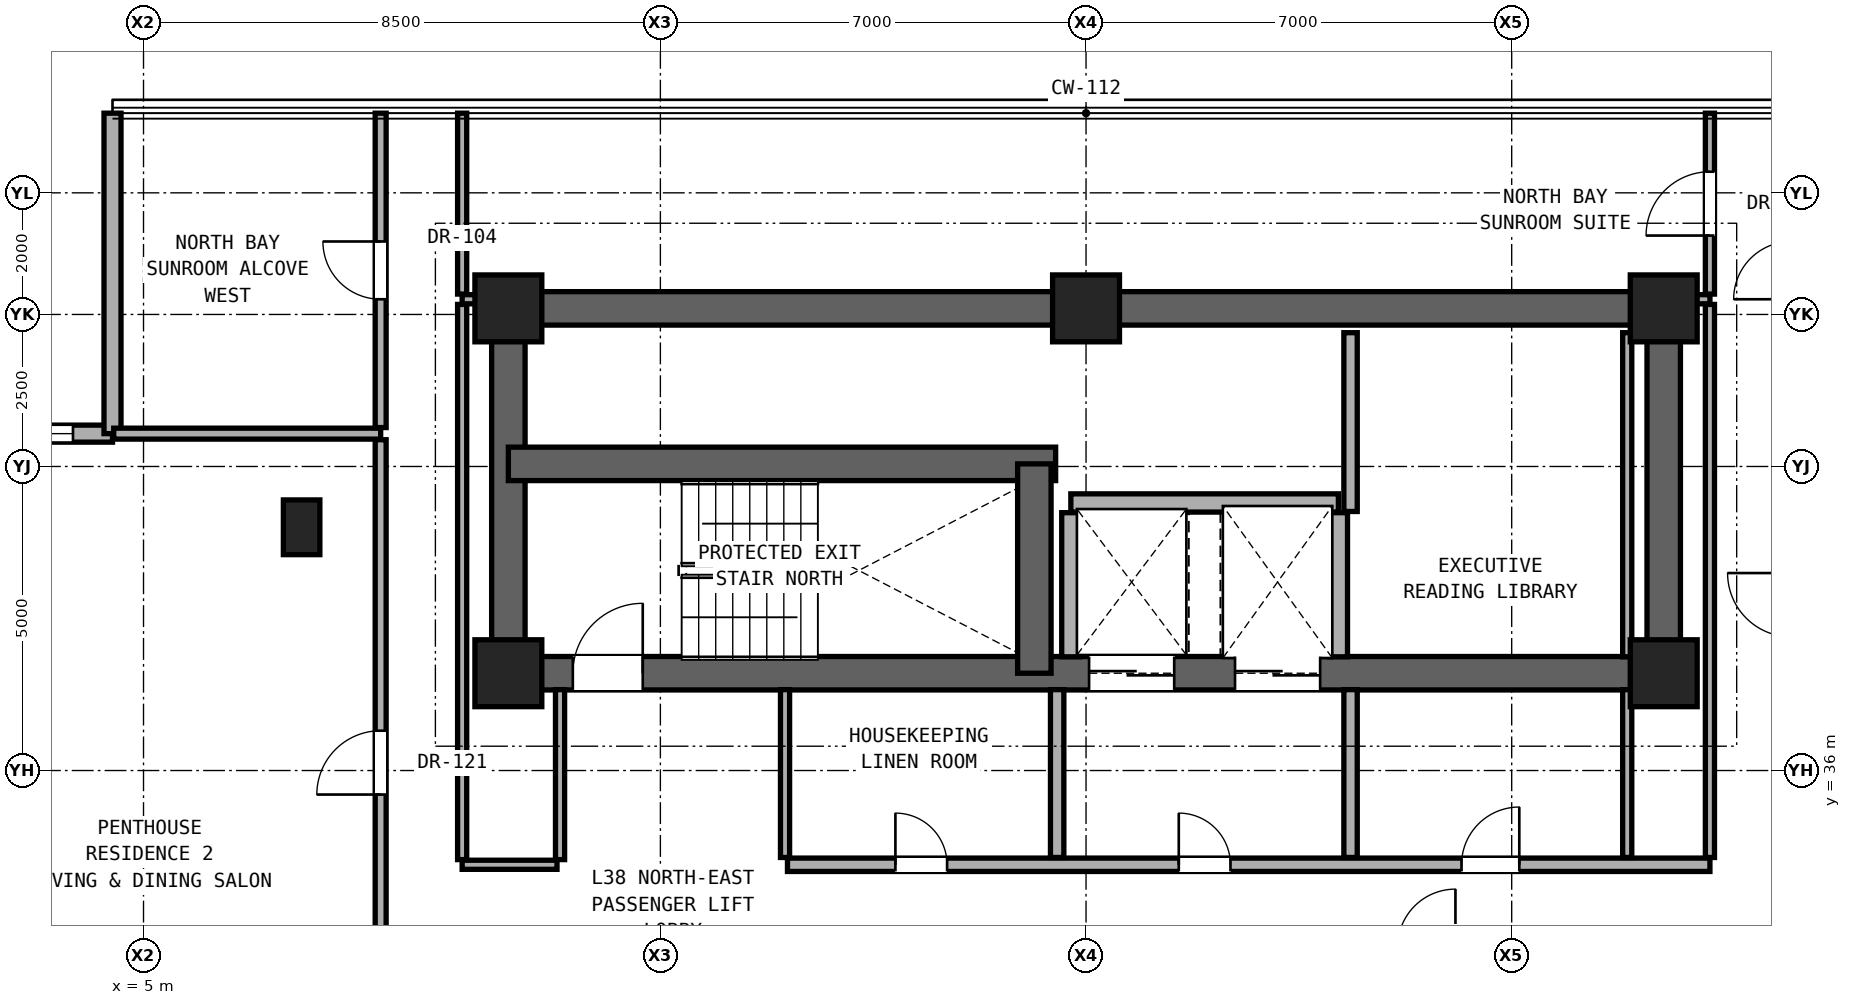
"""IFC4 building model, lengths in metres.
Left out: names, types, materials, properties, quantities, classifications, styles, units other than length and angle.
Written with IfcOpenShell. Run it as: python <this file> out.ifc"""

import sys

from ifc_helpers import new_model, si_unit, direction, frame, frame_2d, origin, origin_2d, place, context, subcontext, project, spatial, rectangle, extrude, element, fill, save


model = new_model("IFC4")
c1 = context("Model", 3, precision=1e-05, world=origin(), true_north=direction((0.0, 1.0)))
c2 = subcontext(c1, "Body", "Model", "MODEL_VIEW")
j1 = project(units=[si_unit("LENGTHUNIT", "METRE"), si_unit("PLANEANGLEUNIT", "RADIAN")], contexts=[c1])
p1 = place(None, origin())
s1 = spatial("IfcSite", under=j1, at=p1, CompositionType="ELEMENT")
p2 = place(p1, origin())
s2 = spatial("IfcBuilding", under=s1, at=p2, CompositionType="ELEMENT")
p3 = place(p2, frame((0.0, 0.0, 134.6)))
s3 = spatial("IfcBuildingStorey", under=s2, at=p3, CompositionType="ELEMENT", Elevation=134.6)
for number, where, z_axis, x_axis in (
    (1, (11.0, 37.6, 0.0), (0.0, 0.0, 1.0), (1.0, 0.0, 0.0)),
    (2, (30.0, 37.6, 0.0), (0.0, 0.0, 1.0), (1.0, 0.0, 0.0)),
    (3, (11.0, 43.6, 0.0), (0.0, 0.0, 1.0), (1.0, 0.0, 0.0)),
    (4, (20.5, 43.6, 0.0), (0.0, 0.0, 1.0), (1.0, 0.0, 0.0)),
    (5, (30.0, 43.6, 0.0), (0.0, 0.0, 1.0), (1.0, 0.0, 0.0)),
):
    element("IfcColumn", number, at=place(p3, frame(where, z_axis=z_axis, x_axis=x_axis)), inside=s3, PredefinedType="COLUMN", context=c2, shape_type="SweptSolid", body=[
        extrude(rectangle(XDim=1.1, YDim=1.1, at=origin_2d()), origin(), (0.0, 0.0, 1.0), 3.3),
    ])
p4 = place(p3, frame((7.6, 40.0, 0.0), z_axis=(0.0, 0.0, 1.0), x_axis=(1.0, 0.0, 0.0)))
e6 = element("IfcColumn", 6, at=p4, inside=s3, PredefinedType="PILASTER", context=c2, shape_type="SweptSolid", body=[
    extrude(rectangle(XDim=0.6, YDim=0.9, at=origin_2d()), origin(), (0.0, 0.0, 1.0), 3.3),
])
p5 = place(p3, frame((11.0, 43.6, 0.0), z_axis=(0.0, 0.0, 1.0), x_axis=(1.0, 0.0, 0.0)))
e7 = element("IfcWall", 7, at=p5, inside=s3, PredefinedType="SHEAR", context=c2, shape_type="SweptSolid", body=[
    extrude(rectangle(XDim=19.0, YDim=0.55, at=frame_2d((9.5, 0.0))), origin(), (0.0, 0.0, 1.0), 3.08),
])
for number, where, z_axis, x_axis in (
    (8, (11.0, 37.6, 0.0), (0.0, 0.0, 1.0), (0.0, 1.0, 0.0)),
    (9, (30.0, 37.6, 0.0), (0.0, 0.0, 1.0), (0.0, 1.0, 0.0)),
):
    element("IfcWall", number, at=place(p3, frame(where, z_axis=z_axis, x_axis=x_axis)), inside=s3, PredefinedType="SHEAR", context=c2, shape_type="SweptSolid", body=[
        extrude(rectangle(XDim=6.0, YDim=0.55, at=frame_2d((3.0, 0.0))), origin(), (0.0, 0.0, 1.0), 3.08),
    ])
p6 = place(p3, frame((11.0, 37.6, 0.0), z_axis=(0.0, 0.0, 1.0), x_axis=(1.0, 0.0, 0.0)))
e10 = element("IfcWall", 10, at=p6, inside=s3, PredefinedType="SHEAR", context=c2, shape_type="SweptSolid", body=[
    extrude(rectangle(XDim=19.0, YDim=0.55, at=frame_2d((9.5, 0.0))), origin(), (0.0, 0.0, 1.0), 3.08),
])
p7 = place(p6, frame((1.06, 0.0, 0.0)))
e11 = element("IfcOpeningElement", 11, at=p7, cuts=e10, PredefinedType="OPENING", context=c2, shape_type="SweptSolid", body=[
    extrude(rectangle(XDim=1.15, YDim=2.2, at=frame_2d((0.575, 1.1))), frame((0.0, 0.285, 0.0), z_axis=(0.0, -1.0, 0.0), x_axis=(1.0, 0.0, 0.0)), (0.0, 0.0, 1.0), 0.57),
])
p8 = place(p6, frame((9.55, 0.0, 0.0)))
e12 = element("IfcOpeningElement", 12, at=p8, cuts=e10, PredefinedType="OPENING", context=c2, shape_type="SweptSolid", body=[
    extrude(rectangle(XDim=1.4, YDim=2.35, at=frame_2d((0.7, 1.175))), frame((0.0, 0.285, 0.0), z_axis=(0.0, -1.0, 0.0), x_axis=(1.0, 0.0, 0.0)), (0.0, 0.0, 1.0), 0.57),
])
p9 = place(p6, frame((11.95, 0.0, 0.0)))
e13 = element("IfcOpeningElement", 13, at=p9, cuts=e10, PredefinedType="OPENING", context=c2, shape_type="SweptSolid", body=[
    extrude(rectangle(XDim=1.4, YDim=2.35, at=frame_2d((0.7, 1.175))), frame((0.0, 0.285, 0.0), z_axis=(0.0, -1.0, 0.0), x_axis=(1.0, 0.0, 0.0)), (0.0, 0.0, 1.0), 0.57),
])
p10 = place(p3, frame((11.0, 41.043, 0.0), z_axis=(0.0, 0.0, 1.0), x_axis=(1.0, 0.0, 0.0)))
e14 = element("IfcWall", 14, at=p10, inside=s3, PredefinedType="SHEAR", context=c2, shape_type="SweptSolid", body=[
    extrude(rectangle(XDim=9.0, YDim=0.55, at=frame_2d((4.5, 0.0))), origin(), (0.0, 0.0, 1.0), 3.08),
])
p11 = place(p3, frame((19.65, 37.6, 0.0), z_axis=(0.0, 0.0, 1.0), x_axis=(0.0, 1.0, 0.0)))
e15 = element("IfcWall", 15, at=p11, inside=s3, PredefinedType="SHEAR", context=c2, shape_type="SweptSolid", body=[
    extrude(rectangle(XDim=3.443, YDim=0.55, at=frame_2d((1.721, 0.0))), origin(), (0.0, 0.0, 1.0), 3.08),
])
p12 = place(p3, frame((4.49, 41.54, 0.0), z_axis=(0.0, 0.0, 1.0), x_axis=(-1.0, 0.0, 0.0)))
e16 = element("IfcWall", 16, at=p12, inside=s3, PredefinedType="SOLIDWALL", context=c2, shape_type="SweptSolid", body=[
    extrude(rectangle(XDim=5.27, YDim=0.28, at=frame_2d((2.635, 0.0))), origin(), (0.0, 0.0, 1.0), 3.06),
])
p13 = place(p12, frame((0.65, 0.0, 0.85)))
e17 = element("IfcOpeningElement", 17, at=p13, cuts=e16, PredefinedType="OPENING", context=c2, shape_type="SweptSolid", body=[
    extrude(rectangle(XDim=1.1, YDim=2.0, at=frame_2d((0.55, 1.0))), frame((0.0, 0.15, 0.0), z_axis=(0.0, -1.0, 0.0), x_axis=(1.0, 0.0, 0.0)), (0.0, 0.0, 1.0), 0.3),
])
p14 = place(p3, frame((4.49, 46.81, 0.0), z_axis=(0.0, 0.0, 1.0), x_axis=(0.0, -1.0, 0.0)))
e18 = element("IfcWall", 18, at=p14, inside=s3, PredefinedType="SOLIDWALL", context=c2, shape_type="SweptSolid", body=[
    extrude(rectangle(XDim=5.27, YDim=0.28, at=frame_2d((2.635, 0.0))), origin(), (0.0, 0.0, 1.0), 3.06),
])
p15 = place(p3, frame((10.24, 34.45, 0.0), z_axis=(0.0, 0.0, 1.0), x_axis=(1.0, 0.0, 0.0)))
e19 = element("IfcWall", 19, at=p15, inside=s3, PredefinedType="PARTITIONING", context=c2, shape_type="SweptSolid", body=[
    extrude(rectangle(XDim=1.56, YDim=0.15, at=frame_2d((0.78, 0.0))), origin(), (0.0, 0.0, 1.0), 2.216),
])
p16 = place(p3, frame((15.59, 34.45, 0.0), z_axis=(0.0, 0.0, 1.0), x_axis=(1.0, 0.0, 0.0)))
e20 = element("IfcWall", 20, at=p16, inside=s3, PredefinedType="SOLIDWALL", context=c2, shape_type="SweptSolid", body=[
    extrude(rectangle(XDim=15.17, YDim=0.22, at=frame_2d((7.585, 0.0))), origin(), (0.0, 0.0, 1.0), 2.216),
])
p17 = place(p16, frame((6.435, 0.0, 0.0)))
e21 = element("IfcOpeningElement", 21, at=p17, cuts=e20, PredefinedType="OPENING", context=c2, shape_type="SweptSolid", body=[
    extrude(rectangle(XDim=0.85, YDim=2.01, at=frame_2d((0.425, 1.005))), frame((0.0, 0.12, 0.0), z_axis=(0.0, -1.0, 0.0), x_axis=(1.0, 0.0, 0.0)), (0.0, 0.0, 1.0), 0.24),
])
p18 = place(p16, frame((11.085, 0.0, 0.0)))
e22 = element("IfcOpeningElement", 22, at=p18, cuts=e20, PredefinedType="OPENING", context=c2, shape_type="SweptSolid", body=[
    extrude(rectangle(XDim=0.95, YDim=2.15, at=frame_2d((0.475, 1.075))), frame((0.0, 0.12, 0.0), z_axis=(0.0, -1.0, 0.0), x_axis=(1.0, 0.0, 0.0)), (0.0, 0.0, 1.0), 0.24),
])
p19 = place(p16, frame((1.775, 0.0, 0.0)))
e23 = element("IfcOpeningElement", 23, at=p19, cuts=e20, PredefinedType="OPENING", context=c2, shape_type="SweptSolid", body=[
    extrude(rectangle(XDim=0.85, YDim=2.01, at=frame_2d((0.425, 1.005))), frame((0.0, 0.12, 0.0), z_axis=(0.0, -1.0, 0.0), x_axis=(1.0, 0.0, 0.0)), (0.0, 0.0, 1.0), 0.24),
])
p20 = place(p3, frame((20.25, 40.4, 0.0), z_axis=(0.0, 0.0, 1.0), x_axis=(1.0, 0.0, 0.0)))
e24 = element("IfcWall", 24, at=p20, inside=s3, PredefinedType="SOLIDWALL", context=c2, shape_type="SweptSolid", body=[
    extrude(rectangle(XDim=4.4, YDim=0.3, at=frame_2d((2.2, 0.0))), origin(), (0.0, 0.0, 1.0), 3.08),
])
p21 = place(p3, frame((4.51, 41.54, 0.0), z_axis=(0.0, 0.0, 1.0), x_axis=(1.0, 0.0, 0.0)))
e25 = element("IfcWall", 25, at=p21, inside=s3, PredefinedType="PARTITIONING", context=c2, shape_type="SweptSolid", body=[
    extrude(rectangle(XDim=4.39, YDim=0.18, at=frame_2d((2.195, 0.0))), origin(), (0.0, 0.0, 1.0), 3.08),
])
for number, where, z_axis, x_axis in (
    (26, (10.24, 43.75, 0.0), (0.0, 0.0, 1.0), (1.0, 0.0, 0.0)),
    (27, (30.27, 43.75, 0.0), (0.0, 0.0, 1.0), (1.0, 0.0, 0.0)),
):
    element("IfcWall", number, at=place(p3, frame(where, z_axis=z_axis, x_axis=x_axis)), inside=s3, PredefinedType="PARTITIONING", context=c2, shape_type="SweptSolid", body=[
        extrude(rectangle(XDim=0.49, YDim=0.15, at=frame_2d((0.245, 0.0))), origin(), (0.0, 0.0, 1.0), 3.08),
    ])
p22 = place(p3, frame((8.9, 30.82, 0.0), z_axis=(0.0, 0.0, 1.0), x_axis=(0.0, 1.0, 0.0)))
e28 = element("IfcWall", 28, at=p22, inside=s3, PredefinedType="PARTITIONING", context=c2, shape_type="SweptSolid", body=[
    extrude(rectangle(XDim=10.62, YDim=0.18, at=frame_2d((5.31, 0.0))), origin(), (0.0, 0.0, 1.0), 2.299),
])
p23 = place(p22, frame((4.785, 0.0, 0.0)))
e29 = element("IfcOpeningElement", 29, at=p23, cuts=e28, PredefinedType="OPENING", context=c2, shape_type="SweptSolid", body=[
    extrude(rectangle(XDim=1.05, YDim=2.2, at=frame_2d((0.525, 1.1))), frame((0.0, 0.1, 0.0), z_axis=(0.0, -1.0, 0.0), x_axis=(1.0, 0.0, 0.0)), (0.0, 0.0, 1.0), 0.2),
])
p24 = place(p3, frame((8.9, 41.64, 0.0), z_axis=(0.0, 0.0, 1.0), x_axis=(0.0, 1.0, 0.0)))
e30 = element("IfcWall", 30, at=p24, inside=s3, PredefinedType="PARTITIONING", context=c2, shape_type="SweptSolid", body=[
    extrude(rectangle(XDim=5.17, YDim=0.18, at=frame_2d((2.585, 0.0))), origin(), (0.0, 0.0, 1.0), 3.08),
])
p25 = place(p24, frame((2.11, 0.0, 0.0)))
e31 = element("IfcOpeningElement", 31, at=p25, cuts=e30, PredefinedType="OPENING", context=c2, shape_type="SweptSolid", body=[
    extrude(rectangle(XDim=0.95, YDim=2.15, at=frame_2d((0.475, 1.075))), frame((0.0, 0.1, 0.0), z_axis=(0.0, -1.0, 0.0), x_axis=(1.0, 0.0, 0.0)), (0.0, 0.0, 1.0), 0.2),
])
p26 = place(p3, frame((10.24, 34.535, 0.0), z_axis=(0.0, 0.0, 1.0), x_axis=(0.0, 1.0, 0.0)))
e32 = element("IfcWall", 32, at=p26, inside=s3, PredefinedType="PARTITIONING", context=c2, shape_type="SweptSolid", body=[
    extrude(rectangle(XDim=9.13, YDim=0.15, at=frame_2d((4.565, 0.0))), origin(), (0.0, 0.0, 1.0), 2.456),
])
p27 = place(p3, frame((10.24, 43.835, 0.0), z_axis=(0.0, 0.0, 1.0), x_axis=(0.0, 1.0, 0.0)))
e33 = element("IfcWall", 33, at=p27, inside=s3, PredefinedType="PARTITIONING", context=c2, shape_type="SweptSolid", body=[
    extrude(rectangle(XDim=2.975, YDim=0.15, at=frame_2d((1.488, 0.0))), origin(), (0.0, 0.0, 1.0), 3.08),
])
p28 = place(p3, frame((11.85, 34.535, 0.0), z_axis=(0.0, 0.0, 1.0), x_axis=(0.0, 1.0, 0.0)))
e34 = element("IfcWall", 34, at=p28, inside=s3, PredefinedType="PARTITIONING", context=c2, shape_type="SweptSolid", body=[
    extrude(rectangle(XDim=2.795, YDim=0.15, at=frame_2d((1.397, 0.0))), origin(), (0.0, 0.0, 1.0), 3.08),
])
p29 = place(p3, frame((15.55, 34.57, 0.0), z_axis=(0.0, 0.0, 1.0), x_axis=(0.0, 1.0, 0.0)))
e35 = element("IfcWall", 35, at=p29, inside=s3, PredefinedType="PARTITIONING", context=c2, shape_type="SweptSolid", body=[
    extrude(rectangle(XDim=2.76, YDim=0.15, at=frame_2d((1.38, 0.0))), origin(), (0.0, 0.0, 1.0), 2.609),
])
p30 = place(p3, frame((20.025, 34.57, 0.0), z_axis=(0.0, 0.0, 1.0), x_axis=(0.0, 1.0, 0.0)))
e36 = element("IfcWall", 36, at=p30, inside=s3, PredefinedType="SOLIDWALL", context=c2, shape_type="SweptSolid", body=[
    extrude(rectangle(XDim=2.76, YDim=0.22, at=frame_2d((1.38, 0.0))), origin(), (0.0, 0.0, 1.0), 3.08),
])
for number, where, z_axis, x_axis in (
    (37, (20.25, 37.87, 0.0), (0.0, 0.0, 1.0), (0.0, 1.0, 0.0)),
    (38, (24.65, 37.87, 0.0), (0.0, 0.0, 1.0), (0.0, 1.0, 0.0)),
):
    element("IfcWall", number, at=place(p3, frame(where, z_axis=z_axis, x_axis=x_axis)), inside=s3, PredefinedType="SOLIDWALL", context=c2, shape_type="SweptSolid", body=[
        extrude(rectangle(XDim=2.37, YDim=0.3, at=frame_2d((1.185, 0.0))), origin(), (0.0, 0.0, 1.0), 3.08),
    ])
p31 = place(p3, frame((24.85, 34.57, 0.0), z_axis=(0.0, 0.0, 1.0), x_axis=(0.0, 1.0, 0.0)))
e39 = element("IfcWall", 39, at=p31, inside=s3, PredefinedType="SOLIDWALL", context=c2, shape_type="SweptSolid", body=[
    extrude(rectangle(XDim=2.76, YDim=0.22, at=frame_2d((1.38, 0.0))), origin(), (0.0, 0.0, 1.0), 3.08),
])
p32 = place(p3, frame((24.85, 40.26, 0.0), z_axis=(0.0, 0.0, 1.0), x_axis=(0.0, 1.0, 0.0)))
e40 = element("IfcWall", 40, at=p32, inside=s3, PredefinedType="SOLIDWALL", context=c2, shape_type="SweptSolid", body=[
    extrude(rectangle(XDim=2.94, YDim=0.22, at=frame_2d((1.47, 0.0))), origin(), (0.0, 0.0, 1.0), 3.08),
])
p33 = place(p3, frame((29.4, 34.57, 0.0), z_axis=(0.0, 0.0, 1.0), x_axis=(0.0, 1.0, 0.0)))
e41 = element("IfcWall", 41, at=p33, inside=s3, PredefinedType="PARTITIONING", context=c2, shape_type="SweptSolid", body=[
    extrude(rectangle(XDim=2.76, YDim=0.15, at=frame_2d((1.38, 0.0))), origin(), (0.0, 0.0, 1.0), 3.08),
])
p34 = place(p3, frame((29.4, 37.87, 0.0), z_axis=(0.0, 0.0, 1.0), x_axis=(0.0, 1.0, 0.0)))
e42 = element("IfcWall", 42, at=p34, inside=s3, PredefinedType="PARTITIONING", context=c2, shape_type="SweptSolid", body=[
    extrude(rectangle(XDim=5.33, YDim=0.15, at=frame_2d((2.665, 0.0))), origin(), (0.0, 0.0, 1.0), 3.08),
])
p35 = place(p3, frame((30.76, 34.57, 0.0), z_axis=(0.0, 0.0, 1.0), x_axis=(0.0, 1.0, 0.0)))
e43 = element("IfcWall", 43, at=p35, inside=s3, PredefinedType="PARTITIONING", context=c2, shape_type="SweptSolid", body=[
    extrude(rectangle(XDim=9.095, YDim=0.15, at=frame_2d((4.547, 0.0))), origin(), (0.0, 0.0, 1.0), 2.456),
])
p36 = place(p3, frame((30.76, 43.835, 0.0), z_axis=(0.0, 0.0, 1.0), x_axis=(0.0, 1.0, 0.0)))
e44 = element("IfcWall", 44, at=p36, inside=s3, PredefinedType="PARTITIONING", context=c2, shape_type="SweptSolid", body=[
    extrude(rectangle(XDim=2.975, YDim=0.15, at=frame_2d((1.488, 0.0))), origin(), (0.0, 0.0, 1.0), 3.08),
])
p37 = place(p36, frame((0.962, 0.0, 0.0)))
e45 = element("IfcOpeningElement", 45, at=p37, cuts=e44, PredefinedType="OPENING", context=c2, shape_type="SweptSolid", body=[
    extrude(rectangle(XDim=1.05, YDim=2.2, at=frame_2d((0.525, 1.1))), frame((0.0, 0.085, 0.0), z_axis=(0.0, -1.0, 0.0), x_axis=(1.0, 0.0, 0.0)), (0.0, 0.0, 1.0), 0.17),
])
p38 = place(p13, origin())
e46 = element("IfcWindow", 46, at=p38, inside=s3, PartitioningType="SINGLE_PANEL", PredefinedType="WINDOW", context=c2, shape_type="SweptSolid", body=[
    extrude(rectangle(XDim=1.1, YDim=2.0, at=frame_2d((0.55, 1.0))), frame((0.0, 0.03, 0.0), z_axis=(0.0, -1.0, 0.0), x_axis=(1.0, 0.0, 0.0)), (0.0, 0.0, 1.0), 0.06),
])
fill(e17, e46)
p39 = place(p7, origin())
e47 = element("IfcDoor", 47, at=p39, inside=s3, OperationType="SINGLE_SWING_RIGHT", PredefinedType="DOOR", context=c2, shape_type="SweptSolid", body=[
    extrude(rectangle(XDim=1.15, YDim=2.2, at=frame_2d((0.575, 1.1))), frame((0.0, 0.025, 0.0), z_axis=(0.0, -1.0, 0.0), x_axis=(1.0, 0.0, 0.0)), (0.0, 0.0, 1.0), 0.05),
])
fill(e11, e47)
p40 = place(p17, origin())
e48 = element("IfcDoor", 48, at=p40, inside=s3, OperationType="SINGLE_SWING_LEFT", PredefinedType="DOOR", context=c2, shape_type="SweptSolid", body=[
    extrude(rectangle(XDim=0.85, YDim=2.01, at=frame_2d((0.425, 1.005))), frame((0.0, 0.025, 0.0), z_axis=(0.0, -1.0, 0.0), x_axis=(1.0, 0.0, 0.0)), (0.0, 0.0, 1.0), 0.05),
])
fill(e21, e48)
p41 = place(p18, origin())
e49 = element("IfcDoor", 49, at=p41, inside=s3, OperationType="SINGLE_SWING_RIGHT", PredefinedType="DOOR", context=c2, shape_type="SweptSolid", body=[
    extrude(rectangle(XDim=0.95, YDim=2.15, at=frame_2d((0.475, 1.075))), frame((0.0, 0.025, 0.0), z_axis=(0.0, -1.0, 0.0), x_axis=(1.0, 0.0, 0.0)), (0.0, 0.0, 1.0), 0.05),
])
fill(e22, e49)
p42 = place(p19, origin())
e50 = element("IfcDoor", 50, at=p42, inside=s3, OperationType="SINGLE_SWING_LEFT", PredefinedType="DOOR", context=c2, shape_type="SweptSolid", body=[
    extrude(rectangle(XDim=0.85, YDim=2.01, at=frame_2d((0.425, 1.005))), frame((0.0, 0.025, 0.0), z_axis=(0.0, -1.0, 0.0), x_axis=(1.0, 0.0, 0.0)), (0.0, 0.0, 1.0), 0.05),
])
fill(e23, e50)
p43 = place(p23, origin())
e51 = element("IfcDoor", 51, at=p43, inside=s3, OperationType="SINGLE_SWING_LEFT", PredefinedType="DOOR", context=c2, shape_type="SweptSolid", body=[
    extrude(rectangle(XDim=1.05, YDim=2.2, at=frame_2d((0.525, 1.1))), frame((0.0, 0.025, 0.0), z_axis=(0.0, -1.0, 0.0), x_axis=(1.0, 0.0, 0.0)), (0.0, 0.0, 1.0), 0.05),
])
fill(e29, e51)
p44 = place(p37, origin())
e52 = element("IfcDoor", 52, at=p44, inside=s3, OperationType="SINGLE_SWING_LEFT", PredefinedType="DOOR", context=c2, shape_type="SweptSolid", body=[
    extrude(rectangle(XDim=1.05, YDim=2.2, at=frame_2d((0.525, 1.1))), frame((0.0, 0.025, 0.0), z_axis=(0.0, -1.0, 0.0), x_axis=(1.0, 0.0, 0.0)), (0.0, 0.0, 1.0), 0.05),
])
fill(e45, e52)
p45 = place(p25, origin())
e53 = element("IfcDoor", 53, at=p45, inside=s3, OperationType="SINGLE_SWING_RIGHT", PredefinedType="DOOR", context=c2, shape_type="SweptSolid", body=[
    extrude(rectangle(XDim=0.95, YDim=2.15, at=frame_2d((0.475, 1.075))), frame((0.0, 0.025, 0.0), z_axis=(0.0, -1.0, 0.0), x_axis=(1.0, 0.0, 0.0)), (0.0, 0.0, 1.0), 0.05),
])
fill(e31, e53)
p46 = place(p8, origin())
e54 = element("IfcDoor", 54, at=p46, inside=s3, OperationType="DOUBLE_DOOR_SLIDING", PredefinedType="DOOR", context=c2, shape_type="SweptSolid", body=[
    extrude(rectangle(XDim=1.4, YDim=2.35, at=frame_2d((0.7, 1.175))), frame((0.0, 0.025, 0.0), z_axis=(0.0, -1.0, 0.0), x_axis=(1.0, 0.0, 0.0)), (0.0, 0.0, 1.0), 0.05),
])
fill(e12, e54)
p47 = place(p9, origin())
e55 = element("IfcDoor", 55, at=p47, inside=s3, OperationType="DOUBLE_DOOR_SLIDING", PredefinedType="DOOR", context=c2, shape_type="SweptSolid", body=[
    extrude(rectangle(XDim=1.4, YDim=2.35, at=frame_2d((0.7, 1.175))), frame((0.0, 0.025, 0.0), z_axis=(0.0, -1.0, 0.0), x_axis=(1.0, 0.0, 0.0)), (0.0, 0.0, 1.0), 0.05),
])
fill(e13, e55)
save(model, sys.argv[1])
